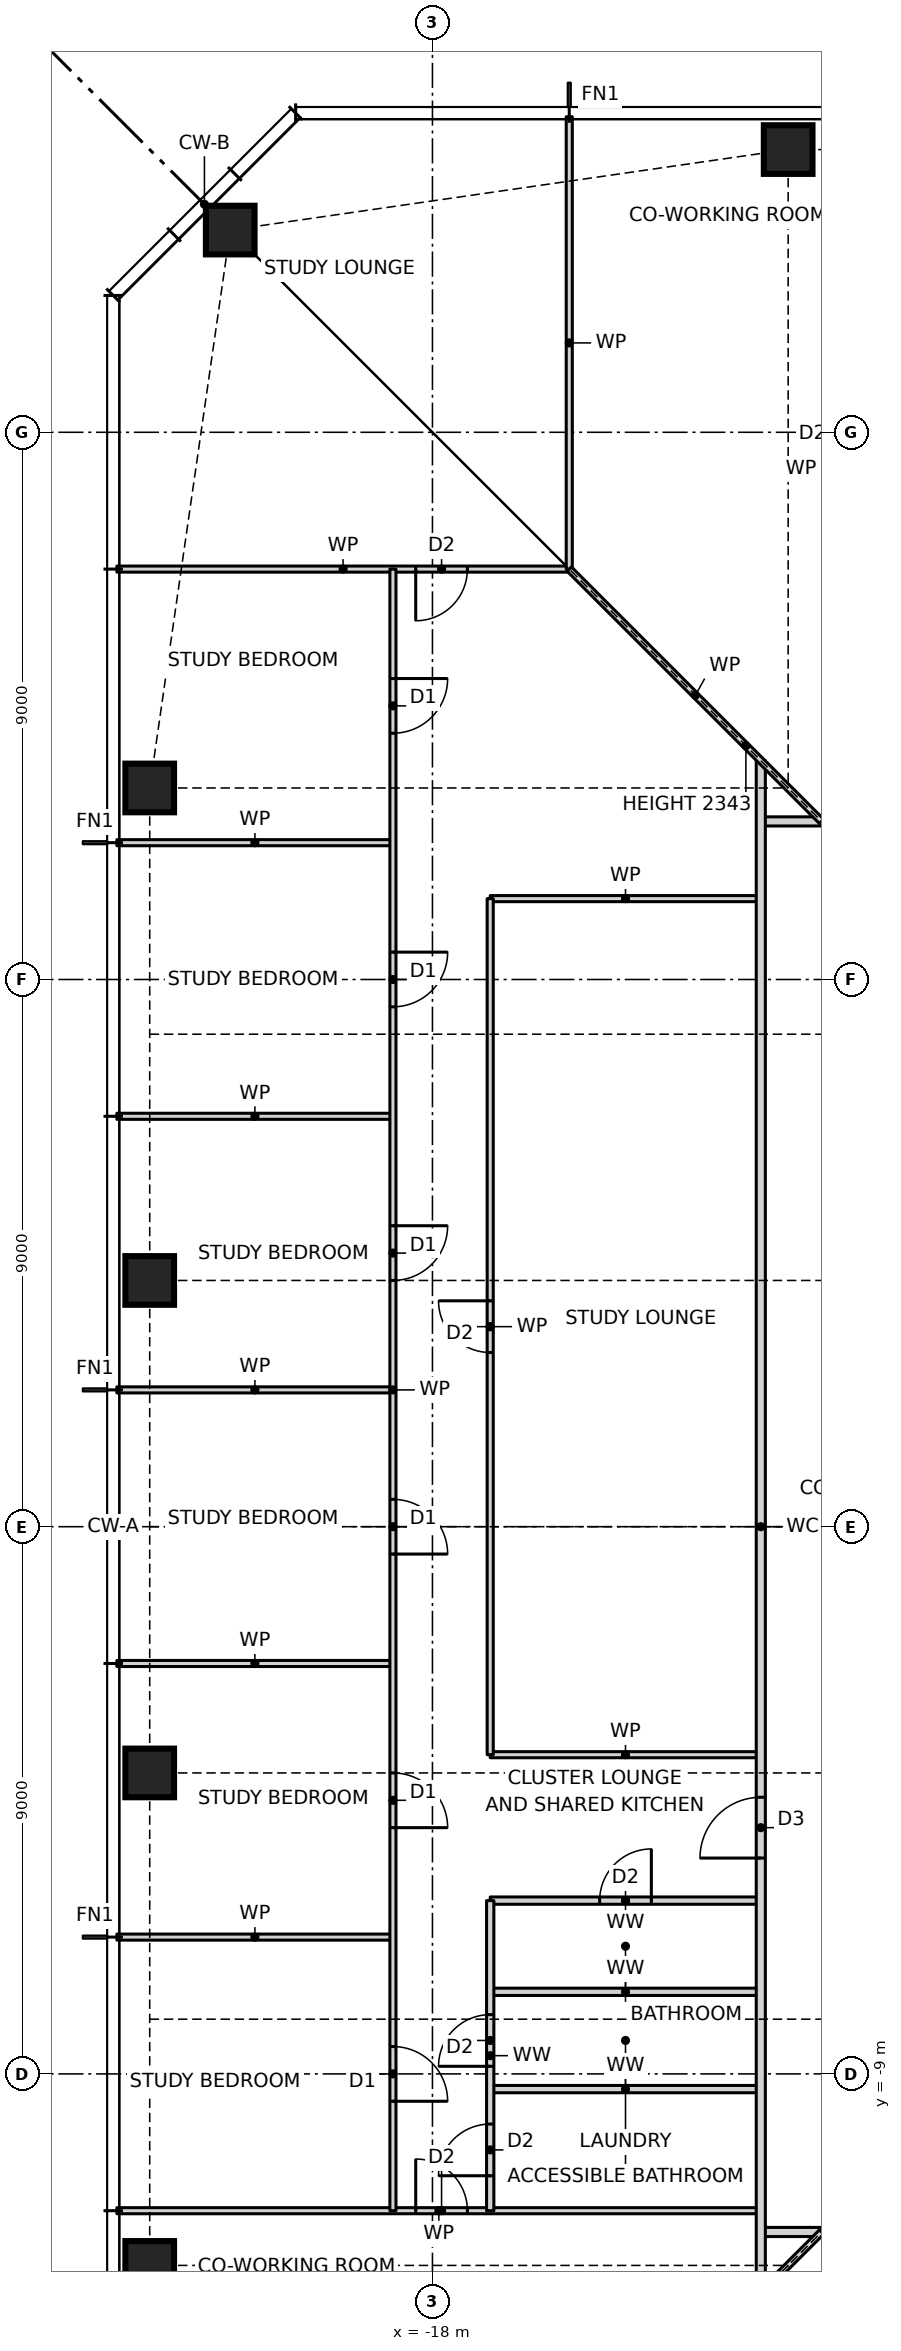
"""IFC4 building model, lengths in metres.
Left out: names, types, materials, properties, quantities, classifications, styles, units other than length and angle.
Written with IfcOpenShell. Run it as: python <this file> out.ifc"""

import sys

from ifc_helpers import new_model, si_unit, direction, frame, frame_2d, origin, origin_2d, place, context, subcontext, project, spatial, rectangle, hollow_rectangle, extrude, element, fill, save


model = new_model("IFC4")
c1 = context("Model", 3, precision=1e-05, world=origin(), true_north=direction((0.0, 1.0)))
c2 = subcontext(c1, "Body", "Model", "MODEL_VIEW")
j1 = project(units=[si_unit("LENGTHUNIT", "METRE"), si_unit("PLANEANGLEUNIT", "RADIAN")], contexts=[c1])
p1 = place(None, origin())
s1 = spatial("IfcSite", under=j1, at=p1, CompositionType="ELEMENT")
p2 = place(p1, origin())
s2 = spatial("IfcBuilding", under=s1, at=p2, CompositionType="ELEMENT")
p3 = place(p2, frame((0.0, 0.0, 53.5)))
s3 = spatial("IfcBuildingStorey", under=s2, at=p3, CompositionType="ELEMENT", Elevation=53.5)
for number, where, z_axis, x_axis in (
    (1, (-12.15, 22.65, 0.0), (0.0, 0.0, 1.0), (1.0, 0.0, 0.0)),
    (2, (-21.326, 21.326, 0.0), (0.0, 0.0, 1.0), (1.0, 0.0, 0.0)),
    (3, (-22.65, 12.15, 0.0), (0.0, 0.0, 1.0), (1.0, 0.0, 0.0)),
    (4, (-22.65, 4.05, 0.0), (0.0, 0.0, 1.0), (1.0, 0.0, 0.0)),
    (5, (-22.65, -4.05, 0.0), (0.0, 0.0, 1.0), (1.0, 0.0, 0.0)),
    (6, (-22.65, -12.15, 0.0), (0.0, 0.0, 1.0), (1.0, 0.0, 0.0)),
):
    element("IfcColumn", number, at=place(p3, frame(where, z_axis=z_axis, x_axis=x_axis)), inside=s3, PredefinedType="COLUMN", context=c2, shape_type="SweptSolid", body=[
        extrude(hollow_rectangle(XDim=0.8, YDim=0.8, WallThickness=0.09, at=origin_2d()), origin(), (0.0, 0.0, 1.0), 3.5),
    ])
p4 = place(p3, frame((-12.6, -11.6, 0.0), z_axis=(0.0, 0.0, 1.0), x_axis=(1.0, 0.0, 0.0)))
e7 = element("IfcWall", 7, at=p4, inside=s3, PredefinedType="PARTITIONING", context=c2, shape_type="SweptSolid", body=[
    extrude(rectangle(XDim=24.2, YDim=0.15, at=frame_2d((12.1, 0.0))), origin(), (0.0, 0.0, 1.0), 3.27),
])
p5 = place(p4, frame((1.74, 0.0, 0.0)))
e8 = element("IfcOpeningElement", 8, at=p5, cuts=e7, PredefinedType="OPENING", context=c2, shape_type="SweptSolid", body=[
    extrude(rectangle(XDim=1.0, YDim=2.1, at=frame_2d((0.5, 1.05))), frame((0.0, 0.085, 0.0), z_axis=(0.0, -1.0, 0.0), x_axis=(1.0, 0.0, 0.0)), (0.0, 0.0, 1.0), 0.17),
])
p6 = place(p4, frame((22.025, 0.0, 0.0)))
e9 = element("IfcOpeningElement", 9, at=p6, cuts=e7, PredefinedType="OPENING", context=c2, shape_type="SweptSolid", body=[
    extrude(rectangle(XDim=1.0, YDim=2.1, at=frame_2d((0.5, 1.05))), frame((0.0, 0.085, 0.0), z_axis=(0.0, -1.0, 0.0), x_axis=(1.0, 0.0, 0.0)), (0.0, 0.0, 1.0), 0.17),
])
p7 = place(p3, frame((-23.19, -11.25, 0.0), z_axis=(0.0, 0.0, 1.0), x_axis=(1.0, 0.0, 0.0)))
e10 = element("IfcWall", 10, at=p7, inside=s3, PredefinedType="PARTITIONING", context=c2, shape_type="SweptSolid", body=[
    extrude(rectangle(XDim=10.59, YDim=0.1, at=frame_2d((5.295, 0.0))), origin(), (0.0, 0.0, 1.0), 3.27),
])
p8 = place(p7, frame((4.915, 0.0, 0.0)))
e11 = element("IfcOpeningElement", 11, at=p8, cuts=e10, PredefinedType="OPENING", context=c2, shape_type="SweptSolid", body=[
    extrude(rectangle(XDim=0.85, YDim=2.1, at=frame_2d((0.425, 1.05))), frame((0.0, 0.06, 0.0), z_axis=(0.0, -1.0, 0.0), x_axis=(1.0, 0.0, 0.0)), (0.0, 0.0, 1.0), 0.12),
])
for number, where, z_axis, x_axis in (
    (12, (-17.05, -9.25, 0.0), (0.0, 0.0, 1.0), (1.0, 0.0, 0.0)),
    (13, (-17.05, -7.65, 0.0), (0.0, 0.0, 1.0), (1.0, 0.0, 0.0)),
):
    element("IfcWall", number, at=place(p3, frame(where, z_axis=z_axis, x_axis=x_axis)), inside=s3, PredefinedType="PARTITIONING", context=c2, shape_type="SweptSolid", body=[
        extrude(rectangle(XDim=4.45, YDim=0.12, at=frame_2d((2.225, 0.0))), origin(), (0.0, 0.0, 1.0), 3.27),
    ])
p9 = place(p3, frame((-23.19, -6.75, 0.0), z_axis=(0.0, 0.0, 1.0), x_axis=(1.0, 0.0, 0.0)))
e14 = element("IfcWall", 14, at=p9, inside=s3, PredefinedType="PARTITIONING", context=c2, shape_type="SweptSolid", body=[
    extrude(rectangle(XDim=4.54, YDim=0.1, at=frame_2d((2.27, 0.0))), origin(), (0.0, 0.0, 1.0), 3.27),
])
p10 = place(p3, frame((-17.05, -6.15, 0.0), z_axis=(0.0, 0.0, 1.0), x_axis=(1.0, 0.0, 0.0)))
e15 = element("IfcWall", 15, at=p10, inside=s3, PredefinedType="PARTITIONING", context=c2, shape_type="SweptSolid", body=[
    extrude(rectangle(XDim=4.45, YDim=0.12, at=frame_2d((2.225, 0.0))), origin(), (0.0, 0.0, 1.0), 3.27),
])
p11 = place(p10, frame((1.8, 0.0, 0.0)))
e16 = element("IfcOpeningElement", 16, at=p11, cuts=e15, PredefinedType="OPENING", context=c2, shape_type="SweptSolid", body=[
    extrude(rectangle(XDim=0.85, YDim=2.1, at=frame_2d((0.425, 1.05))), frame((0.0, 0.07, 0.0), z_axis=(0.0, -1.0, 0.0), x_axis=(1.0, 0.0, 0.0)), (0.0, 0.0, 1.0), 0.14),
])
p12 = place(p3, frame((-17.05, -3.75, 0.0), z_axis=(0.0, 0.0, 1.0), x_axis=(1.0, 0.0, 0.0)))
e17 = element("IfcWall", 17, at=p12, inside=s3, PredefinedType="PARTITIONING", context=c2, shape_type="SweptSolid", body=[
    extrude(rectangle(XDim=4.45, YDim=0.1, at=frame_2d((2.225, 0.0))), origin(), (0.0, 0.0, 1.0), 3.27),
])
for number, where, z_axis, x_axis in (
    (18, (-23.19, -2.25, 0.0), (0.0, 0.0, 1.0), (1.0, 0.0, 0.0)),
    (19, (-23.19, 2.25, 0.0), (0.0, 0.0, 1.0), (1.0, 0.0, 0.0)),
    (20, (-23.19, 6.75, 0.0), (0.0, 0.0, 1.0), (1.0, 0.0, 0.0)),
):
    element("IfcWall", number, at=place(p3, frame(where, z_axis=z_axis, x_axis=x_axis)), inside=s3, PredefinedType="PARTITIONING", context=c2, shape_type="SweptSolid", body=[
        extrude(rectangle(XDim=4.54, YDim=0.1, at=frame_2d((2.27, 0.0))), origin(), (0.0, 0.0, 1.0), 3.27),
    ])
p13 = place(p3, frame((-17.05, 10.33, 0.0), z_axis=(0.0, 0.0, 1.0), x_axis=(1.0, 0.0, 0.0)))
e21 = element("IfcWall", 21, at=p13, inside=s3, PredefinedType="PARTITIONING", context=c2, shape_type="SweptSolid", body=[
    extrude(rectangle(XDim=4.45, YDim=0.1, at=frame_2d((2.225, 0.0))), origin(), (0.0, 0.0, 1.0), 3.27),
])
p14 = place(p3, frame((-23.19, 11.25, 0.0), z_axis=(0.0, 0.0, 1.0), x_axis=(1.0, 0.0, 0.0)))
e22 = element("IfcWall", 22, at=p14, inside=s3, PredefinedType="PARTITIONING", context=c2, shape_type="SweptSolid", body=[
    extrude(rectangle(XDim=4.54, YDim=0.1, at=frame_2d((2.27, 0.0))), origin(), (0.0, 0.0, 1.0), 3.27),
])
p15 = place(p3, frame((-12.6, 11.6, 0.0), z_axis=(0.0, 0.0, 1.0), x_axis=(1.0, 0.0, 0.0)))
e23 = element("IfcWall", 23, at=p15, inside=s3, PredefinedType="PARTITIONING", context=c2, shape_type="SweptSolid", body=[
    extrude(rectangle(XDim=24.2, YDim=0.15, at=frame_2d((12.1, 0.0))), origin(), (0.0, 0.0, 1.0), 3.27),
])
p16 = place(p15, frame((8.95, 0.0, 0.0)))
e24 = element("IfcOpeningElement", 24, at=p16, cuts=e23, PredefinedType="OPENING", context=c2, shape_type="SweptSolid", body=[
    extrude(rectangle(XDim=1.0, YDim=2.1, at=frame_2d((0.5, 1.05))), frame((0.0, 0.085, 0.0), z_axis=(0.0, -1.0, 0.0), x_axis=(1.0, 0.0, 0.0)), (0.0, 0.0, 1.0), 0.17),
])
p17 = place(p15, frame((6.9, 0.0, 0.0)))
e25 = element("IfcOpeningElement", 25, at=p17, cuts=e23, PredefinedType="OPENING", context=c2, shape_type="SweptSolid", body=[
    extrude(rectangle(XDim=0.9, YDim=2.1, at=frame_2d((0.45, 1.05))), frame((0.0, 0.085, 0.0), z_axis=(0.0, -1.0, 0.0), x_axis=(1.0, 0.0, 0.0)), (0.0, 0.0, 1.0), 0.17),
])
p18 = place(p3, frame((-23.19, 15.75, 0.0), z_axis=(0.0, 0.0, 1.0), x_axis=(1.0, 0.0, 0.0)))
e26 = element("IfcWall", 26, at=p18, inside=s3, PredefinedType="PARTITIONING", context=c2, shape_type="SweptSolid", body=[
    extrude(rectangle(XDim=7.44, YDim=0.1, at=frame_2d((3.72, 0.0))), origin(), (0.0, 0.0, 1.0), 3.27),
])
p19 = place(p18, frame((4.915, 0.0, 0.0)))
e27 = element("IfcOpeningElement", 27, at=p19, cuts=e26, PredefinedType="OPENING", context=c2, shape_type="SweptSolid", body=[
    extrude(rectangle(XDim=0.85, YDim=2.1, at=frame_2d((0.425, 1.05))), frame((0.0, 0.06, 0.0), z_axis=(0.0, -1.0, 0.0), x_axis=(1.0, 0.0, 0.0)), (0.0, 0.0, 1.0), 0.12),
])
p20 = place(p3, frame((-15.75, -15.75, 0.0), z_axis=(0.0, 0.0, 1.0), x_axis=(0.707106781187, 0.707106781187, 0.0)))
e28 = element("IfcWall", 28, at=p20, inside=s3, PredefinedType="PARTITIONING", context=c2, shape_type="SweptSolid", body=[
    extrude(rectangle(XDim=5.869, YDim=0.1, at=frame_2d((2.935, 0.0))), origin(), (0.0, 0.0, 1.0), 2.343),
])
p21 = place(p3, frame((-12.6, -12.6, 0.0), z_axis=(0.0, 0.0, 1.0), x_axis=(0.0, 1.0, 0.0)))
e29 = element("IfcWall", 29, at=p21, inside=s3, PredefinedType="PARTITIONING", context=c2, shape_type="SweptSolid", body=[
    extrude(rectangle(XDim=25.2, YDim=0.15, at=frame_2d((12.6, 0.0))), origin(), (0.0, 0.0, 1.0), 3.27),
])
p22 = place(p21, frame((7.15, 0.0, 0.0)))
e30 = element("IfcOpeningElement", 30, at=p22, cuts=e29, PredefinedType="OPENING", context=c2, shape_type="SweptSolid", body=[
    extrude(rectangle(XDim=1.0, YDim=2.1, at=frame_2d((0.5, 1.05))), frame((0.0, 0.085, 0.0), z_axis=(0.0, -1.0, 0.0), x_axis=(1.0, 0.0, 0.0)), (0.0, 0.0, 1.0), 0.17),
])
p23 = place(p3, frame((-15.75, 15.75, 0.0), z_axis=(0.0, 0.0, 1.0), x_axis=(0.0, 1.0, 0.0)))
e31 = element("IfcWall", 31, at=p23, inside=s3, PredefinedType="PARTITIONING", context=c2, shape_type="SweptSolid", body=[
    extrude(rectangle(XDim=7.44, YDim=0.1, at=frame_2d((3.72, 0.0))), origin(), (0.0, 0.0, 1.0), 3.27),
])
p24 = place(p3, frame((-17.05, -11.25, 0.0), z_axis=(0.0, 0.0, 1.0), x_axis=(0.0, 1.0, 0.0)))
e32 = element("IfcWall", 32, at=p24, inside=s3, PredefinedType="PARTITIONING", context=c2, shape_type="SweptSolid", body=[
    extrude(rectangle(XDim=5.1, YDim=0.12, at=frame_2d((2.55, 0.0))), origin(), (0.0, 0.0, 1.0), 3.27),
])
p25 = place(p24, frame((2.375, 0.0, 0.0)))
e33 = element("IfcOpeningElement", 33, at=p25, cuts=e32, PredefinedType="OPENING", context=c2, shape_type="SweptSolid", body=[
    extrude(rectangle(XDim=0.85, YDim=2.1, at=frame_2d((0.425, 1.05))), frame((0.0, 0.07, 0.0), z_axis=(0.0, -1.0, 0.0), x_axis=(1.0, 0.0, 0.0)), (0.0, 0.0, 1.0), 0.14),
])
p26 = place(p24, frame((0.575, 0.0, 0.0)))
e34 = element("IfcOpeningElement", 34, at=p26, cuts=e32, PredefinedType="OPENING", context=c2, shape_type="SweptSolid", body=[
    extrude(rectangle(XDim=0.85, YDim=2.1, at=frame_2d((0.425, 1.05))), frame((0.0, 0.07, 0.0), z_axis=(0.0, -1.0, 0.0), x_axis=(1.0, 0.0, 0.0)), (0.0, 0.0, 1.0), 0.14),
])
p27 = place(p3, frame((-17.05, -3.75, 0.0), z_axis=(0.0, 0.0, 1.0), x_axis=(0.0, 1.0, 0.0)))
e35 = element("IfcWall", 35, at=p27, inside=s3, PredefinedType="PARTITIONING", context=c2, shape_type="SweptSolid", body=[
    extrude(rectangle(XDim=14.08, YDim=0.1, at=frame_2d((7.04, 0.0))), origin(), (0.0, 0.0, 1.0), 3.27),
])
p28 = place(p27, frame((6.615, 0.0, 0.0)))
e36 = element("IfcOpeningElement", 36, at=p28, cuts=e35, PredefinedType="OPENING", context=c2, shape_type="SweptSolid", body=[
    extrude(rectangle(XDim=0.85, YDim=2.1, at=frame_2d((0.425, 1.05))), frame((0.0, 0.06, 0.0), z_axis=(0.0, -1.0, 0.0), x_axis=(1.0, 0.0, 0.0)), (0.0, 0.0, 1.0), 0.12),
])
p29 = place(p3, frame((-18.65, -11.25, 0.0), z_axis=(0.0, 0.0, 1.0), x_axis=(0.0, 1.0, 0.0)))
e37 = element("IfcWall", 37, at=p29, inside=s3, PredefinedType="PARTITIONING", context=c2, shape_type="SweptSolid", body=[
    extrude(rectangle(XDim=27.0, YDim=0.1, at=frame_2d((13.5, 0.0))), origin(), (0.0, 0.0, 1.0), 3.27),
])
p30 = place(p29, frame((24.3, 0.0, 0.0)))
e38 = element("IfcOpeningElement", 38, at=p30, cuts=e37, PredefinedType="OPENING", context=c2, shape_type="SweptSolid", body=[
    extrude(rectangle(XDim=0.9, YDim=2.1, at=frame_2d((0.45, 1.05))), frame((0.0, 0.06, 0.0), z_axis=(0.0, -1.0, 0.0), x_axis=(1.0, 0.0, 0.0)), (0.0, 0.0, 1.0), 0.12),
])
p31 = place(p29, frame((19.8, 0.0, 0.0)))
e39 = element("IfcOpeningElement", 39, at=p31, cuts=e37, PredefinedType="OPENING", context=c2, shape_type="SweptSolid", body=[
    extrude(rectangle(XDim=0.9, YDim=2.1, at=frame_2d((0.45, 1.05))), frame((0.0, 0.06, 0.0), z_axis=(0.0, -1.0, 0.0), x_axis=(1.0, 0.0, 0.0)), (0.0, 0.0, 1.0), 0.12),
])
p32 = place(p29, frame((15.3, 0.0, 0.0)))
e40 = element("IfcOpeningElement", 40, at=p32, cuts=e37, PredefinedType="OPENING", context=c2, shape_type="SweptSolid", body=[
    extrude(rectangle(XDim=0.9, YDim=2.1, at=frame_2d((0.45, 1.05))), frame((0.0, 0.06, 0.0), z_axis=(0.0, -1.0, 0.0), x_axis=(1.0, 0.0, 0.0)), (0.0, 0.0, 1.0), 0.12),
])
p33 = place(p29, frame((10.8, 0.0, 0.0)))
e41 = element("IfcOpeningElement", 41, at=p33, cuts=e37, PredefinedType="OPENING", context=c2, shape_type="SweptSolid", body=[
    extrude(rectangle(XDim=0.9, YDim=2.1, at=frame_2d((0.45, 1.05))), frame((0.0, 0.06, 0.0), z_axis=(0.0, -1.0, 0.0), x_axis=(1.0, 0.0, 0.0)), (0.0, 0.0, 1.0), 0.12),
])
p34 = place(p29, frame((6.3, 0.0, 0.0)))
e42 = element("IfcOpeningElement", 42, at=p34, cuts=e37, PredefinedType="OPENING", context=c2, shape_type="SweptSolid", body=[
    extrude(rectangle(XDim=0.9, YDim=2.1, at=frame_2d((0.45, 1.05))), frame((0.0, 0.06, 0.0), z_axis=(0.0, -1.0, 0.0), x_axis=(1.0, 0.0, 0.0)), (0.0, 0.0, 1.0), 0.12),
])
p35 = place(p29, frame((1.8, 0.0, 0.0)))
e43 = element("IfcOpeningElement", 43, at=p35, cuts=e37, PredefinedType="OPENING", context=c2, shape_type="SweptSolid", body=[
    extrude(rectangle(XDim=0.9, YDim=2.1, at=frame_2d((0.45, 1.05))), frame((0.0, 0.06, 0.0), z_axis=(0.0, -1.0, 0.0), x_axis=(1.0, 0.0, 0.0)), (0.0, 0.0, 1.0), 0.12),
])
p36 = place(p3, frame((-11.6, 11.6, 0.0), z_axis=(0.0, 0.0, 1.0), x_axis=(-0.707106781187, 0.707106781187, 0.0)))
e44 = element("IfcWall", 44, at=p36, inside=s3, PredefinedType="PARTITIONING", context=c2, shape_type="SweptSolid", body=[
    extrude(rectangle(XDim=5.869, YDim=0.1, at=frame_2d((2.935, 0.0))), origin(), (0.0, 0.0, 1.0), 2.343),
])
p37 = place(p30, frame((0.9, 0.0, 0.0), z_axis=(0.0, 0.0, 1.0), x_axis=(-1.0, 0.0, 0.0)))
e45 = element("IfcDoor", 45, at=p37, inside=s3, OperationType="SINGLE_SWING_LEFT", PredefinedType="DOOR", context=c2, shape_type="SweptSolid", body=[
    extrude(rectangle(XDim=0.9, YDim=2.1, at=frame_2d((0.45, 1.05))), frame((0.0, 0.025, 0.0), z_axis=(0.0, -1.0, 0.0), x_axis=(1.0, 0.0, 0.0)), (0.0, 0.0, 1.0), 0.05),
])
fill(e38, e45)
p38 = place(p31, frame((0.9, 0.0, 0.0), z_axis=(0.0, 0.0, 1.0), x_axis=(-1.0, 0.0, 0.0)))
e46 = element("IfcDoor", 46, at=p38, inside=s3, OperationType="SINGLE_SWING_LEFT", PredefinedType="DOOR", context=c2, shape_type="SweptSolid", body=[
    extrude(rectangle(XDim=0.9, YDim=2.1, at=frame_2d((0.45, 1.05))), frame((0.0, 0.025, 0.0), z_axis=(0.0, -1.0, 0.0), x_axis=(1.0, 0.0, 0.0)), (0.0, 0.0, 1.0), 0.05),
])
fill(e39, e46)
p39 = place(p32, frame((0.9, 0.0, 0.0), z_axis=(0.0, 0.0, 1.0), x_axis=(-1.0, 0.0, 0.0)))
e47 = element("IfcDoor", 47, at=p39, inside=s3, OperationType="SINGLE_SWING_LEFT", PredefinedType="DOOR", context=c2, shape_type="SweptSolid", body=[
    extrude(rectangle(XDim=0.9, YDim=2.1, at=frame_2d((0.45, 1.05))), frame((0.0, 0.025, 0.0), z_axis=(0.0, -1.0, 0.0), x_axis=(1.0, 0.0, 0.0)), (0.0, 0.0, 1.0), 0.05),
])
fill(e40, e47)
p40 = place(p33, frame((0.9, 0.0, 0.0), z_axis=(0.0, 0.0, 1.0), x_axis=(-1.0, 0.0, 0.0)))
e48 = element("IfcDoor", 48, at=p40, inside=s3, OperationType="SINGLE_SWING_RIGHT", PredefinedType="DOOR", context=c2, shape_type="SweptSolid", body=[
    extrude(rectangle(XDim=0.9, YDim=2.1, at=frame_2d((0.45, 1.05))), frame((0.0, 0.025, 0.0), z_axis=(0.0, -1.0, 0.0), x_axis=(1.0, 0.0, 0.0)), (0.0, 0.0, 1.0), 0.05),
])
fill(e41, e48)
p41 = place(p34, frame((0.9, 0.0, 0.0), z_axis=(0.0, 0.0, 1.0), x_axis=(-1.0, 0.0, 0.0)))
e49 = element("IfcDoor", 49, at=p41, inside=s3, OperationType="SINGLE_SWING_RIGHT", PredefinedType="DOOR", context=c2, shape_type="SweptSolid", body=[
    extrude(rectangle(XDim=0.9, YDim=2.1, at=frame_2d((0.45, 1.05))), frame((0.0, 0.025, 0.0), z_axis=(0.0, -1.0, 0.0), x_axis=(1.0, 0.0, 0.0)), (0.0, 0.0, 1.0), 0.05),
])
fill(e42, e49)
p42 = place(p35, frame((0.9, 0.0, 0.0), z_axis=(0.0, 0.0, 1.0), x_axis=(-1.0, 0.0, 0.0)))
e50 = element("IfcDoor", 50, at=p42, inside=s3, OperationType="SINGLE_SWING_RIGHT", PredefinedType="DOOR", context=c2, shape_type="SweptSolid", body=[
    extrude(rectangle(XDim=0.9, YDim=2.1, at=frame_2d((0.45, 1.05))), frame((0.0, 0.025, 0.0), z_axis=(0.0, -1.0, 0.0), x_axis=(1.0, 0.0, 0.0)), (0.0, 0.0, 1.0), 0.05),
])
fill(e43, e50)
p43 = place(p22, origin())
e51 = element("IfcDoor", 51, at=p43, inside=s3, OperationType="SINGLE_SWING_LEFT", PredefinedType="DOOR", context=c2, shape_type="SweptSolid", body=[
    extrude(rectangle(XDim=1.0, YDim=2.1, at=frame_2d((0.5, 1.05))), frame((0.0, 0.025, 0.0), z_axis=(0.0, -1.0, 0.0), x_axis=(1.0, 0.0, 0.0)), (0.0, 0.0, 1.0), 0.05),
])
fill(e30, e51)
p44 = place(p28, origin())
e52 = element("IfcDoor", 52, at=p44, inside=s3, OperationType="SINGLE_SWING_RIGHT", PredefinedType="DOOR", context=c2, shape_type="SweptSolid", body=[
    extrude(rectangle(XDim=0.85, YDim=2.1, at=frame_2d((0.425, 1.05))), frame((0.0, 0.025, 0.0), z_axis=(0.0, -1.0, 0.0), x_axis=(1.0, 0.0, 0.0)), (0.0, 0.0, 1.0), 0.05),
])
fill(e36, e52)
p45 = place(p11, origin())
e53 = element("IfcDoor", 53, at=p45, inside=s3, OperationType="SINGLE_SWING_RIGHT", PredefinedType="DOOR", context=c2, shape_type="SweptSolid", body=[
    extrude(rectangle(XDim=0.85, YDim=2.1, at=frame_2d((0.425, 1.05))), frame((0.0, 0.025, 0.0), z_axis=(0.0, -1.0, 0.0), x_axis=(1.0, 0.0, 0.0)), (0.0, 0.0, 1.0), 0.05),
])
fill(e16, e53)
p46 = place(p25, origin())
e54 = element("IfcDoor", 54, at=p46, inside=s3, OperationType="SINGLE_SWING_LEFT", PredefinedType="DOOR", context=c2, shape_type="SweptSolid", body=[
    extrude(rectangle(XDim=0.85, YDim=2.1, at=frame_2d((0.425, 1.05))), frame((0.0, 0.025, 0.0), z_axis=(0.0, -1.0, 0.0), x_axis=(1.0, 0.0, 0.0)), (0.0, 0.0, 1.0), 0.05),
])
fill(e33, e54)
p47 = place(p26, origin())
e55 = element("IfcDoor", 55, at=p47, inside=s3, OperationType="SINGLE_SWING_LEFT", PredefinedType="DOOR", context=c2, shape_type="SweptSolid", body=[
    extrude(rectangle(XDim=0.85, YDim=2.1, at=frame_2d((0.425, 1.05))), frame((0.0, 0.025, 0.0), z_axis=(0.0, -1.0, 0.0), x_axis=(1.0, 0.0, 0.0)), (0.0, 0.0, 1.0), 0.05),
])
fill(e34, e55)
p48 = place(p8, origin())
e56 = element("IfcDoor", 56, at=p48, inside=s3, OperationType="SINGLE_SWING_LEFT", PredefinedType="DOOR", context=c2, shape_type="SweptSolid", body=[
    extrude(rectangle(XDim=0.85, YDim=2.1, at=frame_2d((0.425, 1.05))), frame((0.0, 0.025, 0.0), z_axis=(0.0, -1.0, 0.0), x_axis=(1.0, 0.0, 0.0)), (0.0, 0.0, 1.0), 0.05),
])
fill(e11, e56)
p49 = place(p19, frame((0.85, 0.0, 0.0), z_axis=(0.0, 0.0, 1.0), x_axis=(-1.0, 0.0, 0.0)))
e57 = element("IfcDoor", 57, at=p49, inside=s3, OperationType="SINGLE_SWING_RIGHT", PredefinedType="DOOR", context=c2, shape_type="SweptSolid", body=[
    extrude(rectangle(XDim=0.85, YDim=2.1, at=frame_2d((0.425, 1.05))), frame((0.0, 0.025, 0.0), z_axis=(0.0, -1.0, 0.0), x_axis=(1.0, 0.0, 0.0)), (0.0, 0.0, 1.0), 0.05),
])
fill(e27, e57)
save(model, sys.argv[1])
